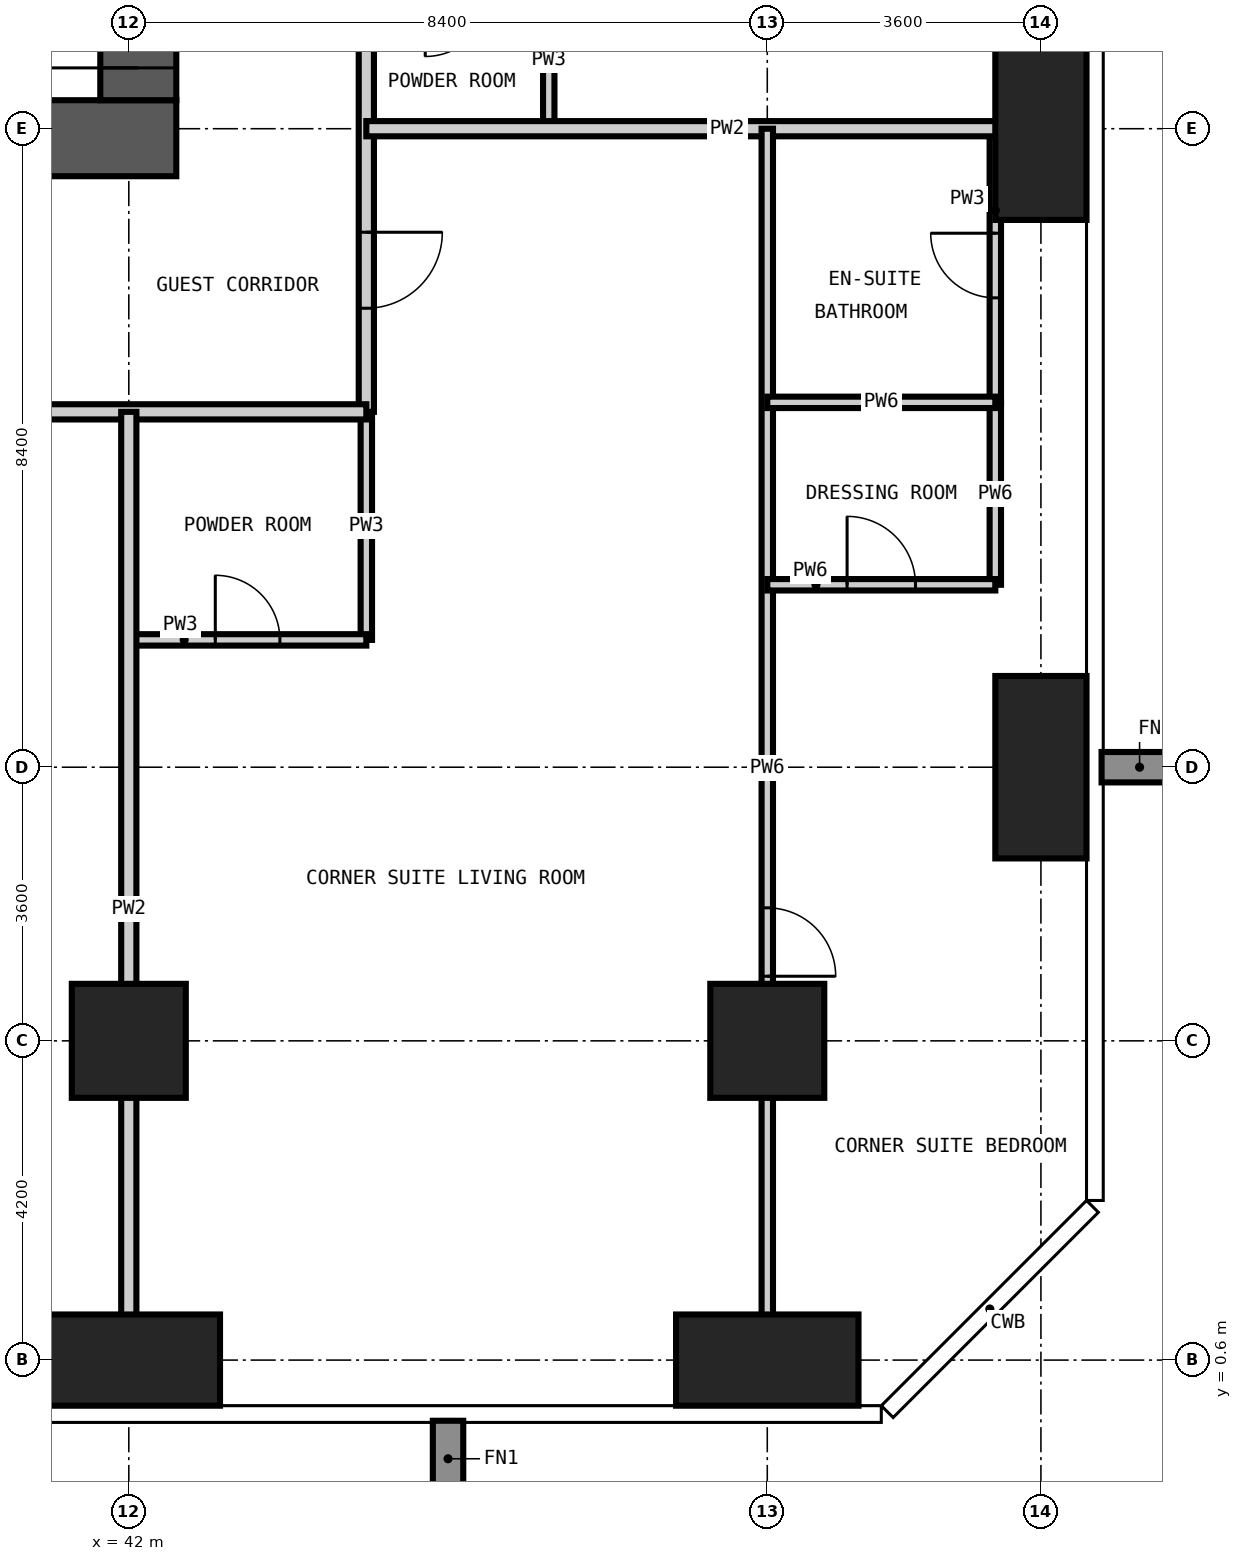
"""IFC4 building model, lengths in metres.
Left out: names, types, materials, properties, quantities, classifications, styles, units other than length and angle.
Written with IfcOpenShell. Run it as: python <this file> out.ifc"""

import sys

from ifc_helpers import new_model, si_unit, direction, frame, frame_2d, origin, origin_2d, place, context, subcontext, project, spatial, rectangle, extrude, element, fill, save


model = new_model("IFC4")
c1 = context("Model", 3, precision=1e-05, world=origin(), true_north=direction((0.0, 1.0)))
c2 = subcontext(c1, "Body", "Model", "MODEL_VIEW")
j1 = project(units=[si_unit("LENGTHUNIT", "METRE"), si_unit("PLANEANGLEUNIT", "RADIAN")], contexts=[c1])
p1 = place(None, origin())
s1 = spatial("IfcSite", under=j1, at=p1, CompositionType="ELEMENT")
p2 = place(p1, origin())
s2 = spatial("IfcBuilding", under=s1, at=p2, CompositionType="ELEMENT")
p3 = place(p2, frame((0.0, 0.0, 118.8)))
s3 = spatial("IfcBuildingStorey", under=s2, at=p3, CompositionType="ELEMENT", Elevation=118.8)
p4 = place(p3, frame((42.0, 0.6, -0.35), z_axis=(0.0, 0.0, 1.0), x_axis=(1.0, 0.0, 0.0)))
e1 = element("IfcColumn", 1, at=p4, inside=s3, PredefinedType="COLUMN", context=c2, shape_type="SweptSolid", body=[
    extrude(rectangle(XDim=2.4, YDim=1.2, at=origin_2d()), origin(), (0.0, 0.0, 1.0), 3.6),
])
p5 = place(p3, frame((42.0, 4.8, -0.35), z_axis=(0.0, 0.0, 1.0), x_axis=(1.0, 0.0, 0.0)))
e2 = element("IfcColumn", 2, at=p5, inside=s3, PredefinedType="COLUMN", context=c2, shape_type="SweptSolid", body=[
    extrude(rectangle(XDim=1.5, YDim=1.5, at=origin_2d()), origin(), (0.0, 0.0, 1.0), 3.6),
])
p6 = place(p3, frame((50.4, 0.6, -0.35), z_axis=(0.0, 0.0, 1.0), x_axis=(1.0, 0.0, 0.0)))
e3 = element("IfcColumn", 3, at=p6, inside=s3, PredefinedType="COLUMN", context=c2, shape_type="SweptSolid", body=[
    extrude(rectangle(XDim=2.4, YDim=1.2, at=origin_2d()), origin(), (0.0, 0.0, 1.0), 3.6),
])
p7 = place(p3, frame((50.4, 4.8, -0.35), z_axis=(0.0, 0.0, 1.0), x_axis=(1.0, 0.0, 0.0)))
e4 = element("IfcColumn", 4, at=p7, inside=s3, PredefinedType="COLUMN", context=c2, shape_type="SweptSolid", body=[
    extrude(rectangle(XDim=1.5, YDim=1.5, at=origin_2d()), origin(), (0.0, 0.0, 1.0), 3.6),
])
for number, where, z_axis, x_axis in (
    (5, (54.0, 8.4, -0.35), (0.0, 0.0, 1.0), (1.0, 0.0, 0.0)),
    (6, (54.0, 16.8, -0.35), (0.0, 0.0, 1.0), (1.0, 0.0, 0.0)),
):
    element("IfcColumn", number, at=place(p3, frame(where, z_axis=z_axis, x_axis=x_axis)), inside=s3, PredefinedType="COLUMN", context=c2, shape_type="SweptSolid", body=[
        extrude(rectangle(XDim=1.2, YDim=2.4, at=origin_2d()), origin(), (0.0, 0.0, 1.0), 3.6),
    ])
p8 = place(p3, frame((16.175, 16.675, -0.35), z_axis=(0.0, 0.0, 1.0), x_axis=(1.0, 0.0, 0.0)))
e7 = element("IfcWall", 7, at=p8, inside=s3, PredefinedType="SHEAR", context=c2, shape_type="SweptSolid", body=[
    extrude(rectangle(XDim=26.45, YDim=1.0, at=frame_2d((13.225, 0.0))), origin(), (0.0, 0.0, 1.0), 3.6),
])
p9 = place(p8, frame((12.725, 0.0, 0.35)))
e8 = element("IfcOpeningElement", 8, at=p9, cuts=e7, PredefinedType="OPENING", context=c2, shape_type="SweptSolid", body=[
    extrude(rectangle(XDim=1.0, YDim=2.1, at=frame_2d((0.5, 1.05))), frame((0.0, 0.51, 0.0), z_axis=(0.0, -1.0, 0.0), x_axis=(1.0, 0.0, 0.0)), (0.0, 0.0, 1.0), 1.02),
])
p10 = place(p8, frame((19.025, 0.0, 0.35)))
e9 = element("IfcOpeningElement", 9, at=p10, cuts=e7, PredefinedType="OPENING", context=c2, shape_type="SweptSolid", body=[
    extrude(rectangle(XDim=1.0, YDim=2.1, at=frame_2d((0.5, 1.05))), frame((0.0, 0.51, 0.0), z_axis=(0.0, -1.0, 0.0), x_axis=(1.0, 0.0, 0.0)), (0.0, 0.0, 1.0), 1.02),
])
p11 = place(p3, frame((42.125, 17.175, -0.35), z_axis=(0.0, 0.0, 1.0), x_axis=(0.0, 1.0, 0.0)))
e10 = element("IfcWall", 10, at=p11, inside=s3, PredefinedType="SHEAR", context=c2, shape_type="SweptSolid", body=[
    extrude(rectangle(XDim=24.45, YDim=1.0, at=frame_2d((12.225, 0.0))), origin(), (0.0, 0.0, 1.0), 3.6),
])
p12 = place(p11, frame((0.425, 0.0, 0.35)))
e11 = element("IfcOpeningElement", 11, at=p12, cuts=e10, PredefinedType="OPENING", context=c2, shape_type="SweptSolid", body=[
    extrude(rectangle(XDim=1.2, YDim=2.2, at=frame_2d((0.6, 1.1))), frame((0.0, 0.51, 0.0), z_axis=(0.0, -1.0, 0.0), x_axis=(1.0, 0.0, 0.0)), (0.0, 0.0, 1.0), 1.02),
])
p13 = place(p11, frame((11.325, 0.0, 0.35)))
e12 = element("IfcOpeningElement", 12, at=p13, cuts=e10, PredefinedType="OPENING", context=c2, shape_type="SweptSolid", body=[
    extrude(rectangle(XDim=1.8, YDim=2.2, at=frame_2d((0.9, 1.1))), frame((0.0, 0.51, 0.0), z_axis=(0.0, -1.0, 0.0), x_axis=(1.0, 0.0, 0.0)), (0.0, 0.0, 1.0), 1.02),
])
p14 = place(p11, frame((20.125, 0.0, 0.35)))
e13 = element("IfcOpeningElement", 13, at=p14, cuts=e10, PredefinedType="OPENING", context=c2, shape_type="SweptSolid", body=[
    extrude(rectangle(XDim=1.0, YDim=2.1, at=frame_2d((0.5, 1.05))), frame((0.0, 0.51, 0.0), z_axis=(0.0, -1.0, 0.0), x_axis=(1.0, 0.0, 0.0)), (0.0, 0.0, 1.0), 1.02),
])
p15 = place(p3, frame((45.125, 10.075, 0.0), z_axis=(0.0, 0.0, 1.0), x_axis=(0.0, 1.0, 0.0)))
e14 = element("IfcWall", 14, at=p15, inside=s3, PredefinedType="PARTITIONING", context=c2, shape_type="SweptSolid", body=[
    extrude(rectangle(XDim=3.0, YDim=0.15, at=frame_2d((1.5, 0.0))), origin(), (0.0, 0.0, 1.0), 3.25),
])
p16 = place(p3, frame((47.525, 16.8, 0.0), z_axis=(0.0, 0.0, 1.0), x_axis=(0.0, 1.0, 0.0)))
e15 = element("IfcWall", 15, at=p16, inside=s3, PredefinedType="PARTITIONING", context=c2, shape_type="SweptSolid", body=[
    extrude(rectangle(XDim=1.8, YDim=0.15, at=frame_2d((0.9, 0.0))), origin(), (0.0, 0.0, 1.0), 3.25),
])
p17 = place(p3, frame((53.4, 13.2, 0.0), z_axis=(0.0, 0.0, 1.0), x_axis=(0.0, 1.0, 0.0)))
e16 = element("IfcWall", 16, at=p17, inside=s3, PredefinedType="PARTITIONING", context=c2, shape_type="SweptSolid", body=[
    extrude(rectangle(XDim=3.6, YDim=0.15, at=frame_2d((1.8, 0.0))), origin(), (0.0, 0.0, 1.0), 3.25),
])
p18 = place(p17, frame((1.375, 0.0, 0.0)))
e17 = element("IfcOpeningElement", 17, at=p18, cuts=e16, PredefinedType="OPENING", context=c2, shape_type="SweptSolid", body=[
    extrude(rectangle(XDim=0.85, YDim=2.1, at=frame_2d((0.425, 1.05))), frame((0.0, 0.085, 0.0), z_axis=(0.0, -1.0, 0.0), x_axis=(1.0, 0.0, 0.0)), (0.0, 0.0, 1.0), 0.17),
])
p19 = place(p3, frame((42.0, 10.075, 0.0), z_axis=(0.0, 0.0, 1.0), x_axis=(1.0, 0.0, 0.0)))
e18 = element("IfcWall", 18, at=p19, inside=s3, PredefinedType="PARTITIONING", context=c2, shape_type="SweptSolid", body=[
    extrude(rectangle(XDim=3.125, YDim=0.15, at=frame_2d((1.562, 0.0))), origin(), (0.0, 0.0, 1.0), 3.25),
])
p20 = place(p19, frame((1.138, 0.0, 0.0)))
e19 = element("IfcOpeningElement", 19, at=p20, cuts=e18, PredefinedType="OPENING", context=c2, shape_type="SweptSolid", body=[
    extrude(rectangle(XDim=0.85, YDim=2.1, at=frame_2d((0.425, 1.05))), frame((0.0, 0.085, 0.0), z_axis=(0.0, -1.0, 0.0), x_axis=(1.0, 0.0, 0.0)), (0.0, 0.0, 1.0), 0.17),
])
p21 = place(p3, frame((45.125, 44.525, 0.0), z_axis=(0.0, 0.0, 1.0), x_axis=(0.0, -1.0, 0.0)))
e20 = element("IfcWall", 20, at=p21, inside=s3, PredefinedType="PARTITIONING", context=c2, shape_type="SweptSolid", body=[
    extrude(rectangle(XDim=31.45, YDim=0.2, at=frame_2d((15.725, 0.0))), origin(), (0.0, 0.0, 1.0), 3.25),
])
p22 = place(p21, frame((24.225, 0.0, 0.0)))
e21 = element("IfcOpeningElement", 21, at=p22, cuts=e20, PredefinedType="OPENING", context=c2, shape_type="SweptSolid", body=[
    extrude(rectangle(XDim=1.0, YDim=2.2, at=frame_2d((0.5, 1.1))), frame((0.0, 0.11, 0.0), z_axis=(0.0, -1.0, 0.0), x_axis=(1.0, 0.0, 0.0)), (0.0, 0.0, 1.0), 0.22),
])
p23 = place(p21, frame((15.825, 0.0, 0.0)))
e22 = element("IfcOpeningElement", 22, at=p23, cuts=e20, PredefinedType="OPENING", context=c2, shape_type="SweptSolid", body=[
    extrude(rectangle(XDim=1.0, YDim=2.2, at=frame_2d((0.5, 1.1))), frame((0.0, 0.11, 0.0), z_axis=(0.0, -1.0, 0.0), x_axis=(1.0, 0.0, 0.0)), (0.0, 0.0, 1.0), 0.22),
])
p24 = place(p21, frame((7.425, 0.0, 0.0)))
e23 = element("IfcOpeningElement", 23, at=p24, cuts=e20, PredefinedType="OPENING", context=c2, shape_type="SweptSolid", body=[
    extrude(rectangle(XDim=1.0, YDim=2.2, at=frame_2d((0.5, 1.1))), frame((0.0, 0.11, 0.0), z_axis=(0.0, -1.0, 0.0), x_axis=(1.0, 0.0, 0.0)), (0.0, 0.0, 1.0), 0.22),
])
p25 = place(p21, frame((29.087, 0.0, 0.0)))
e24 = element("IfcOpeningElement", 24, at=p25, cuts=e20, PredefinedType="OPENING", context=c2, shape_type="SweptSolid", body=[
    extrude(rectangle(XDim=1.0, YDim=2.2, at=frame_2d((0.5, 1.1))), frame((0.0, 0.11, 0.0), z_axis=(0.0, -1.0, 0.0), x_axis=(1.0, 0.0, 0.0)), (0.0, 0.0, 1.0), 0.22),
])
p26 = place(p21, frame((0.762, 0.0, 0.0)))
e25 = element("IfcOpeningElement", 25, at=p26, cuts=e20, PredefinedType="OPENING", context=c2, shape_type="SweptSolid", body=[
    extrude(rectangle(XDim=1.0, YDim=2.2, at=frame_2d((0.5, 1.1))), frame((0.0, 0.11, 0.0), z_axis=(0.0, -1.0, 0.0), x_axis=(1.0, 0.0, 0.0)), (0.0, 0.0, 1.0), 0.22),
])
p27 = place(p3, frame((45.125, 13.075, 0.0), z_axis=(0.0, 0.0, 1.0), x_axis=(-1.0, 0.0, 0.0)))
e26 = element("IfcWall", 26, at=p27, inside=s3, PredefinedType="PARTITIONING", context=c2, shape_type="SweptSolid", body=[
    extrude(rectangle(XDim=32.525, YDim=0.2, at=frame_2d((16.262, 0.0))), origin(), (0.0, 0.0, 1.0), 3.25),
])
p28 = place(p27, frame((22.425, 0.0, 0.0)))
e27 = element("IfcOpeningElement", 27, at=p28, cuts=e26, PredefinedType="OPENING", context=c2, shape_type="SweptSolid", body=[
    extrude(rectangle(XDim=1.0, YDim=2.2, at=frame_2d((0.5, 1.1))), frame((0.0, 0.11, 0.0), z_axis=(0.0, -1.0, 0.0), x_axis=(1.0, 0.0, 0.0)), (0.0, 0.0, 1.0), 0.22),
])
p29 = place(p27, frame((14.025, 0.0, 0.0)))
e28 = element("IfcOpeningElement", 28, at=p29, cuts=e26, PredefinedType="OPENING", context=c2, shape_type="SweptSolid", body=[
    extrude(rectangle(XDim=1.0, YDim=2.2, at=frame_2d((0.5, 1.1))), frame((0.0, 0.11, 0.0), z_axis=(0.0, -1.0, 0.0), x_axis=(1.0, 0.0, 0.0)), (0.0, 0.0, 1.0), 0.22),
])
p30 = place(p27, frame((5.625, 0.0, 0.0)))
e29 = element("IfcOpeningElement", 29, at=p30, cuts=e26, PredefinedType="OPENING", context=c2, shape_type="SweptSolid", body=[
    extrude(rectangle(XDim=1.0, YDim=2.2, at=frame_2d((0.5, 1.1))), frame((0.0, 0.11, 0.0), z_axis=(0.0, -1.0, 0.0), x_axis=(1.0, 0.0, 0.0)), (0.0, 0.0, 1.0), 0.22),
])
p31 = place(p3, frame((42.0, -0.018, 0.0), z_axis=(0.0, 0.0, 1.0), x_axis=(0.0, 1.0, 0.0)))
e30 = element("IfcWall", 30, at=p31, inside=s3, PredefinedType="PARTITIONING", context=c2, shape_type="SweptSolid", body=[
    extrude(rectangle(XDim=13.093, YDim=0.2, at=frame_2d((6.546, 0.0))), origin(), (0.0, 0.0, 1.0), 3.25),
])
p32 = place(p3, frame((45.125, 16.8, 0.0), z_axis=(0.0, 0.0, 1.0), x_axis=(1.0, 0.0, 0.0)))
e31 = element("IfcWall", 31, at=p32, inside=s3, PredefinedType="PARTITIONING", context=c2, shape_type="SweptSolid", body=[
    extrude(rectangle(XDim=9.493, YDim=0.2, at=frame_2d((4.747, 0.0))), origin(), (0.0, 0.0, 1.0), 3.25),
])
p33 = place(p3, frame((50.4, -0.018, 0.0), z_axis=(0.0, 0.0, 1.0), x_axis=(0.0, 1.0, 0.0)))
e32 = element("IfcWall", 32, at=p33, inside=s3, PredefinedType="PARTITIONING", context=c2, shape_type="SweptSolid", body=[
    extrude(rectangle(XDim=16.818, YDim=0.15, at=frame_2d((8.409, 0.0))), origin(), (0.0, 0.0, 1.0), 3.25),
])
p34 = place(p33, frame((5.668, 0.0, 0.0)))
e33 = element("IfcOpeningElement", 33, at=p34, cuts=e32, PredefinedType="OPENING", context=c2, shape_type="SweptSolid", body=[
    extrude(rectangle(XDim=0.9, YDim=2.1, at=frame_2d((0.45, 1.05))), frame((0.0, 0.085, 0.0), z_axis=(0.0, -1.0, 0.0), x_axis=(1.0, 0.0, 0.0)), (0.0, 0.0, 1.0), 0.17),
])
p35 = place(p3, frame((53.4, 10.8, 0.0), z_axis=(0.0, 0.0, 1.0), x_axis=(0.0, 1.0, 0.0)))
e34 = element("IfcWall", 34, at=p35, inside=s3, PredefinedType="PARTITIONING", context=c2, shape_type="SweptSolid", body=[
    extrude(rectangle(XDim=2.4, YDim=0.15, at=frame_2d((1.2, 0.0))), origin(), (0.0, 0.0, 1.0), 3.25),
])
p36 = place(p3, frame((50.4, 10.8, 0.0), z_axis=(0.0, 0.0, 1.0), x_axis=(1.0, 0.0, 0.0)))
e35 = element("IfcWall", 35, at=p36, inside=s3, PredefinedType="PARTITIONING", context=c2, shape_type="SweptSolid", body=[
    extrude(rectangle(XDim=3.0, YDim=0.15, at=frame_2d((1.5, 0.0))), origin(), (0.0, 0.0, 1.0), 3.25),
])
p37 = place(p36, frame((1.05, 0.0, 0.0)))
e36 = element("IfcOpeningElement", 36, at=p37, cuts=e35, PredefinedType="OPENING", context=c2, shape_type="SweptSolid", body=[
    extrude(rectangle(XDim=0.9, YDim=2.1, at=frame_2d((0.45, 1.05))), frame((0.0, 0.085, 0.0), z_axis=(0.0, -1.0, 0.0), x_axis=(1.0, 0.0, 0.0)), (0.0, 0.0, 1.0), 0.17),
])
p38 = place(p3, frame((50.4, 13.2, 0.0), z_axis=(0.0, 0.0, 1.0), x_axis=(1.0, 0.0, 0.0)))
e37 = element("IfcWall", 37, at=p38, inside=s3, PredefinedType="PARTITIONING", context=c2, shape_type="SweptSolid", body=[
    extrude(rectangle(XDim=3.0, YDim=0.15, at=frame_2d((1.5, 0.0))), origin(), (0.0, 0.0, 1.0), 3.25),
])
p39 = place(p12, origin())
e38 = element("IfcDoor", 38, at=p39, inside=s3, OperationType="SINGLE_SWING_LEFT", PredefinedType="DOOR", context=c2, shape_type="SweptSolid", body=[
    extrude(rectangle(XDim=1.2, YDim=2.2, at=frame_2d((0.6, 1.1))), frame((0.0, 0.025, 0.0), z_axis=(0.0, -1.0, 0.0), x_axis=(1.0, 0.0, 0.0)), (0.0, 0.0, 1.0), 0.05),
])
fill(e11, e38)
p40 = place(p25, origin())
e39 = element("IfcDoor", 39, at=p40, inside=s3, OperationType="SINGLE_SWING_LEFT", PredefinedType="DOOR", context=c2, shape_type="SweptSolid", body=[
    extrude(rectangle(XDim=1.0, YDim=2.2, at=frame_2d((0.5, 1.1))), frame((0.0, 0.025, 0.0), z_axis=(0.0, -1.0, 0.0), x_axis=(1.0, 0.0, 0.0)), (0.0, 0.0, 1.0), 0.05),
])
fill(e24, e39)
p41 = place(p20, origin())
e40 = element("IfcDoor", 40, at=p41, inside=s3, OperationType="SINGLE_SWING_LEFT", PredefinedType="DOOR", context=c2, shape_type="SweptSolid", body=[
    extrude(rectangle(XDim=0.85, YDim=2.1, at=frame_2d((0.425, 1.05))), frame((0.0, 0.025, 0.0), z_axis=(0.0, -1.0, 0.0), x_axis=(1.0, 0.0, 0.0)), (0.0, 0.0, 1.0), 0.05),
])
fill(e19, e40)
p42 = place(p34, frame((0.9, 0.0, 0.0), z_axis=(0.0, 0.0, 1.0), x_axis=(-1.0, 0.0, 0.0)))
e41 = element("IfcDoor", 41, at=p42, inside=s3, OperationType="SINGLE_SWING_RIGHT", PredefinedType="DOOR", context=c2, shape_type="SweptSolid", body=[
    extrude(rectangle(XDim=0.9, YDim=2.1, at=frame_2d((0.45, 1.05))), frame((0.0, 0.025, 0.0), z_axis=(0.0, -1.0, 0.0), x_axis=(1.0, 0.0, 0.0)), (0.0, 0.0, 1.0), 0.05),
])
fill(e33, e41)
p43 = place(p18, origin())
e42 = element("IfcDoor", 42, at=p43, inside=s3, OperationType="SINGLE_SWING_RIGHT", PredefinedType="DOOR", context=c2, shape_type="SweptSolid", body=[
    extrude(rectangle(XDim=0.85, YDim=2.1, at=frame_2d((0.425, 1.05))), frame((0.0, 0.025, 0.0), z_axis=(0.0, -1.0, 0.0), x_axis=(1.0, 0.0, 0.0)), (0.0, 0.0, 1.0), 0.05),
])
fill(e17, e42)
p44 = place(p37, origin())
e43 = element("IfcDoor", 43, at=p44, inside=s3, OperationType="SINGLE_SWING_LEFT", PredefinedType="DOOR", context=c2, shape_type="SweptSolid", body=[
    extrude(rectangle(XDim=0.9, YDim=2.1, at=frame_2d((0.45, 1.05))), frame((0.0, 0.025, 0.0), z_axis=(0.0, -1.0, 0.0), x_axis=(1.0, 0.0, 0.0)), (0.0, 0.0, 1.0), 0.05),
])
fill(e36, e43)
save(model, sys.argv[1])
